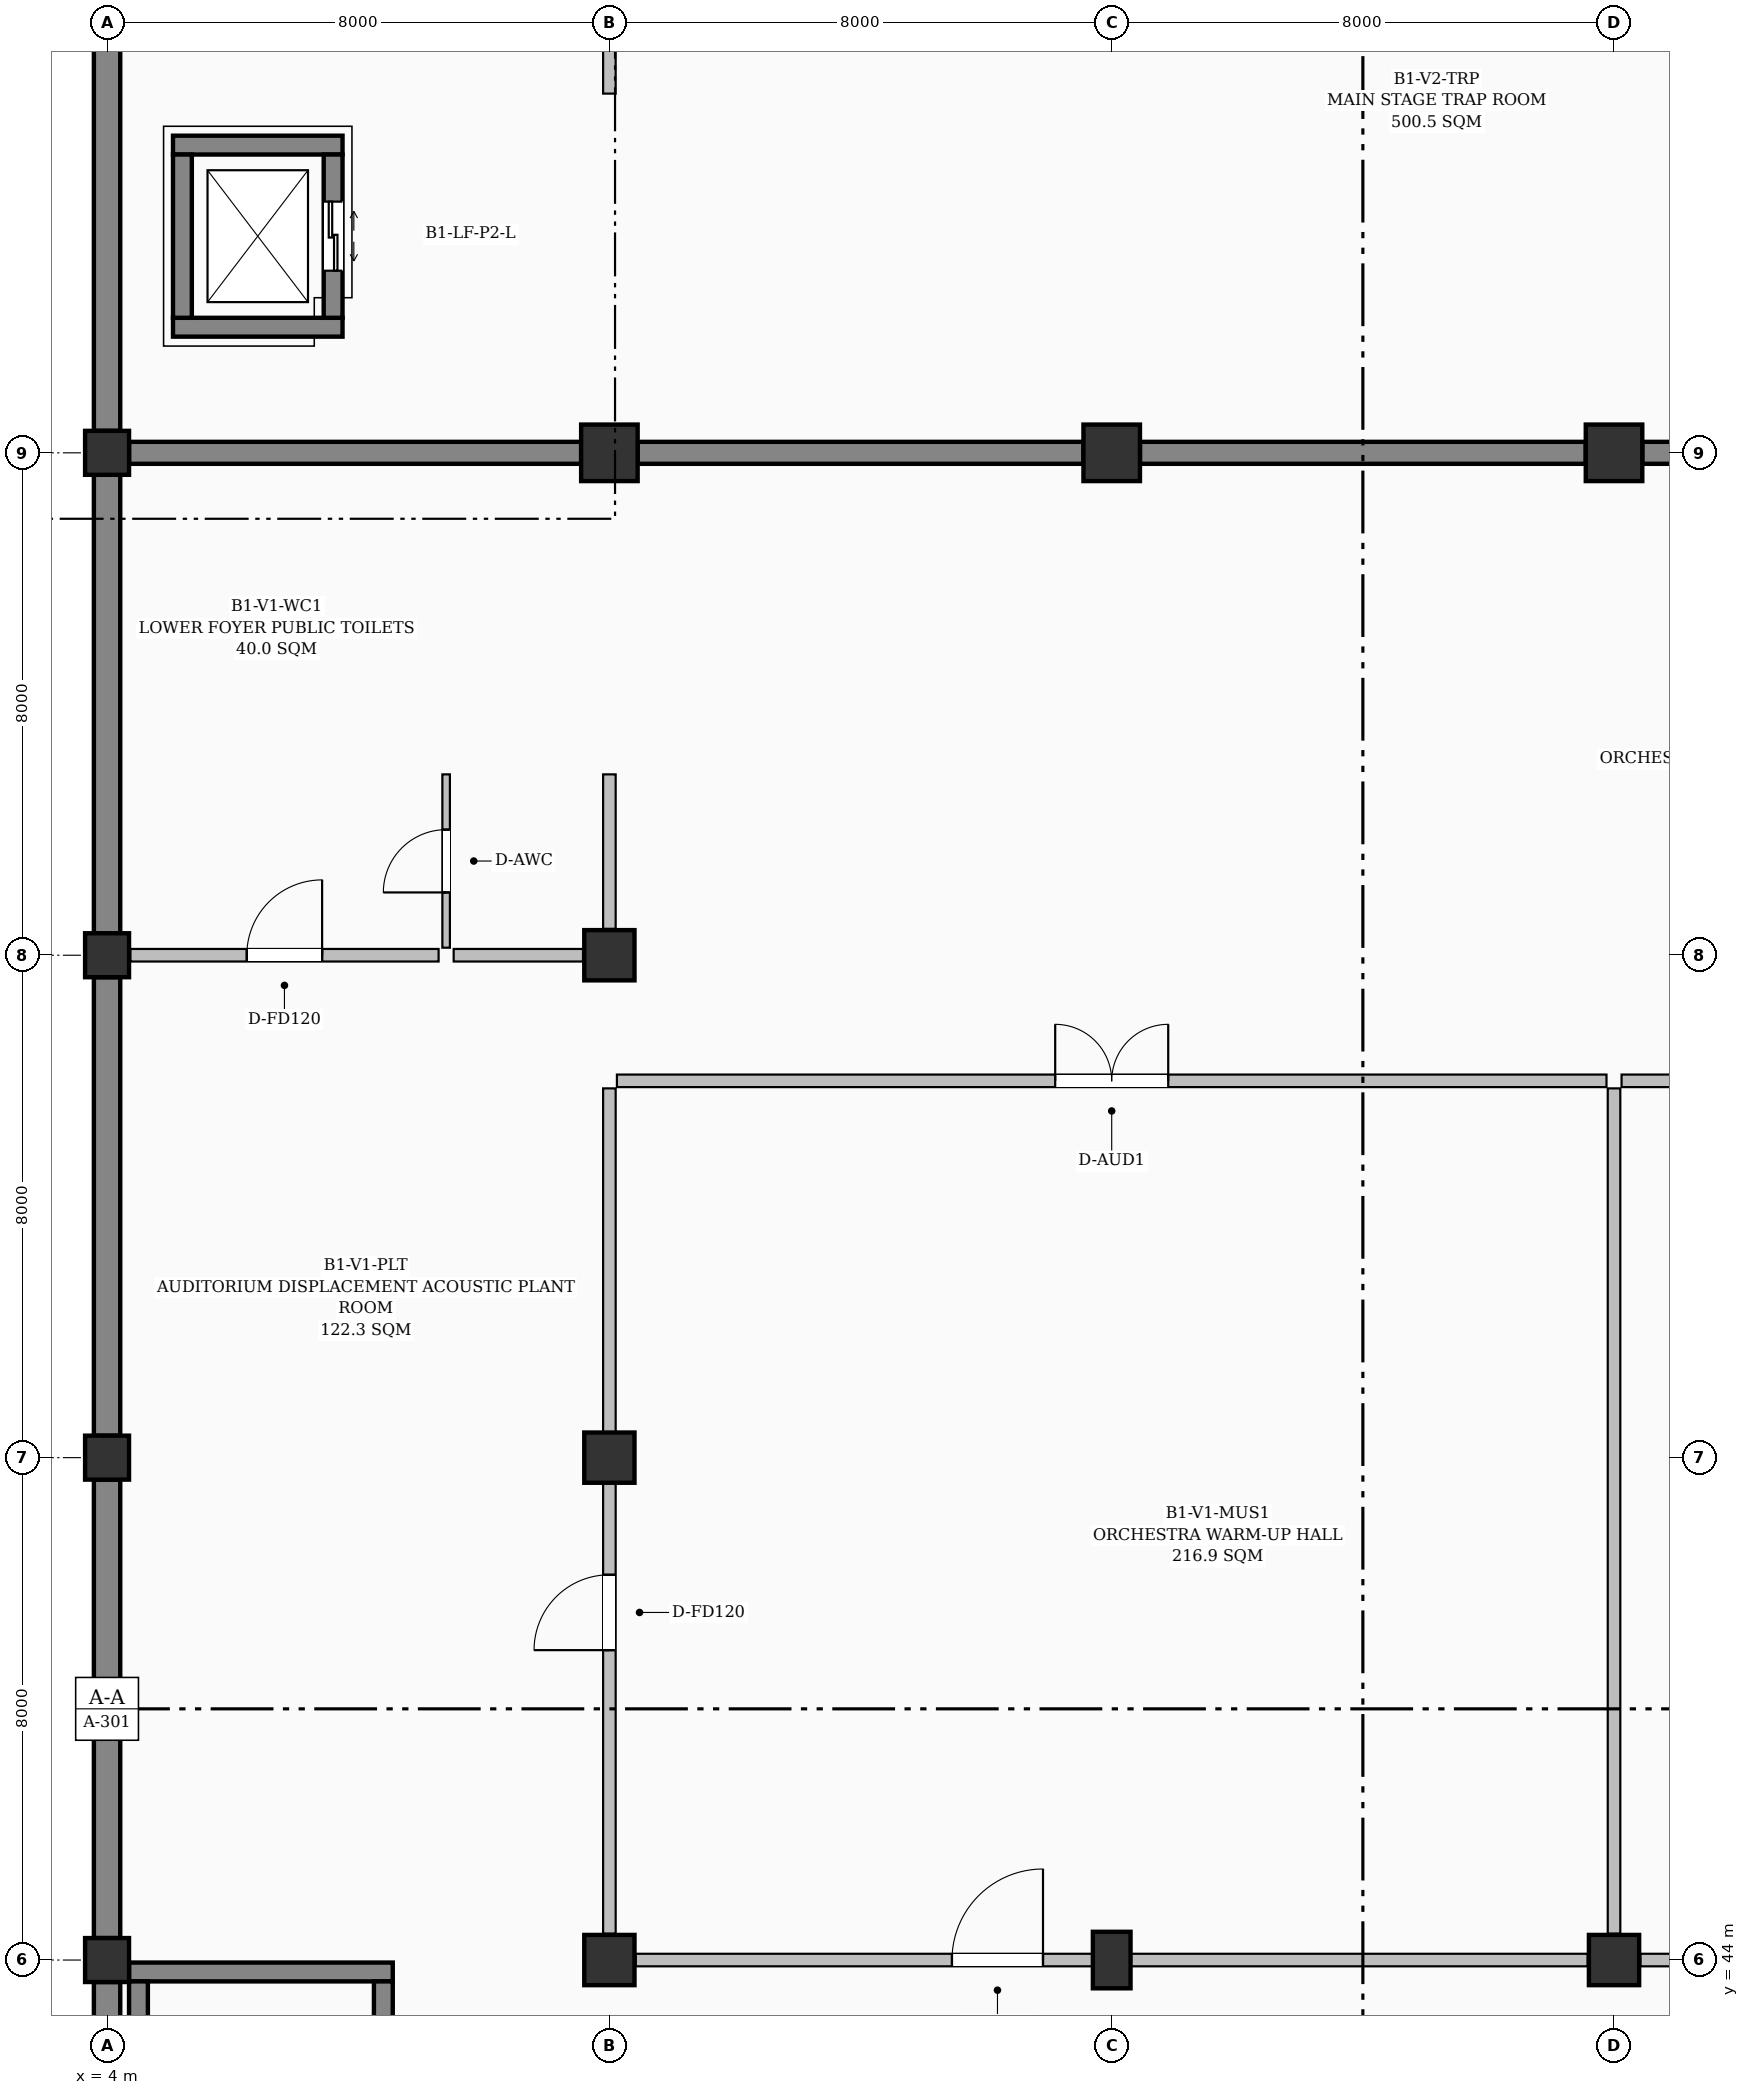
"""IFC4 building model, lengths in metres.
Left out: names, types, materials, properties, quantities, classifications, styles, units other than length and angle.
Written with IfcOpenShell. Run it as: python <this file> out.ifc"""

import sys

from ifc_helpers import new_model, si_unit, direction, frame, frame_2d, origin, origin_2d, place, context, subcontext, project, spatial, rectangle, extrude, element, fill, save


model = new_model("IFC4")
c1 = context("Model", 3, precision=1e-05, world=origin(), true_north=direction((0.0, 1.0)))
c2 = subcontext(c1, "Body", "Model", "MODEL_VIEW")
j1 = project(units=[si_unit("LENGTHUNIT", "METRE"), si_unit("PLANEANGLEUNIT", "RADIAN")], contexts=[c1])
p1 = place(None, origin())
s1 = spatial("IfcSite", under=j1, at=p1, CompositionType="ELEMENT")
p2 = place(p1, origin())
s2 = spatial("IfcBuilding", under=s1, at=p2, CompositionType="ELEMENT")
p3 = place(p2, frame((0.0, 0.0, -4.8)))
s3 = spatial("IfcBuildingStorey", under=s2, at=p3, CompositionType="ELEMENT", Elevation=-4.8)
for number, where, z_axis, x_axis in (
    (1, (4.0, 44.0, -0.38), (0.0, 0.0, 1.0), (1.0, 0.0, 0.0)),
    (2, (4.0, 52.0, -0.38), (0.0, 0.0, 1.0), (1.0, 0.0, 0.0)),
    (3, (4.0, 60.0, -0.38), (0.0, 0.0, 1.0), (1.0, 0.0, 0.0)),
    (4, (4.0, 68.0, -0.38), (0.0, 0.0, 1.0), (1.0, 0.0, 0.0)),
):
    element("IfcColumn", number, at=place(p3, frame(where, z_axis=z_axis, x_axis=x_axis)), inside=s3, PredefinedType="COLUMN", context=c2, shape_type="SweptSolid", body=[
        extrude(rectangle(XDim=0.7, YDim=0.7, at=origin_2d()), origin(), (0.0, 0.0, 1.0), 5.18),
    ])
for number, where, z_axis, x_axis in (
    (5, (12.0, 44.0, -0.38), (0.0, 0.0, 1.0), (1.0, 0.0, 0.0)),
    (6, (12.0, 52.0, -0.38), (0.0, 0.0, 1.0), (1.0, 0.0, 0.0)),
    (7, (12.0, 60.0, -0.38), (0.0, 0.0, 1.0), (1.0, 0.0, 0.0)),
):
    element("IfcColumn", number, at=place(p3, frame(where, z_axis=z_axis, x_axis=x_axis)), inside=s3, PredefinedType="COLUMN", context=c2, shape_type="SweptSolid", body=[
        extrude(rectangle(XDim=0.8, YDim=0.8, at=origin_2d()), origin(), (0.0, 0.0, 1.0), 5.18),
    ])
p4 = place(p3, frame((12.0, 68.0, -0.38), z_axis=(0.0, 0.0, 1.0), x_axis=(1.0, 0.0, 0.0)))
e8 = element("IfcColumn", 8, at=p4, inside=s3, PredefinedType="COLUMN", context=c2, shape_type="SweptSolid", body=[
    extrude(rectangle(XDim=0.9, YDim=0.9, at=origin_2d()), origin(), (0.0, 0.0, 1.0), 5.18),
])
p5 = place(p3, frame((20.0, 44.0, -0.38), z_axis=(0.0, 0.0, 1.0), x_axis=(1.0, 0.0, 0.0)))
e9 = element("IfcColumn", 9, at=p5, inside=s3, PredefinedType="COLUMN", context=c2, shape_type="SweptSolid", body=[
    extrude(rectangle(XDim=0.6, YDim=0.9, at=origin_2d()), origin(), (0.0, 0.0, 1.0), 5.18),
])
p6 = place(p3, frame((20.0, 68.0, -0.38), z_axis=(0.0, 0.0, 1.0), x_axis=(1.0, 0.0, 0.0)))
e10 = element("IfcColumn", 10, at=p6, inside=s3, PredefinedType="COLUMN", context=c2, shape_type="SweptSolid", body=[
    extrude(rectangle(XDim=0.9, YDim=0.9, at=origin_2d()), origin(), (0.0, 0.0, 1.0), 5.18),
])
p7 = place(p3, frame((28.0, 44.0, -0.38), z_axis=(0.0, 0.0, 1.0), x_axis=(1.0, 0.0, 0.0)))
e11 = element("IfcColumn", 11, at=p7, inside=s3, PredefinedType="COLUMN", context=c2, shape_type="SweptSolid", body=[
    extrude(rectangle(XDim=0.8, YDim=0.8, at=origin_2d()), origin(), (0.0, 0.0, 1.0), 5.18),
])
p8 = place(p3, frame((28.0, 68.0, -0.38), z_axis=(0.0, 0.0, 1.0), x_axis=(1.0, 0.0, 0.0)))
e12 = element("IfcColumn", 12, at=p8, inside=s3, PredefinedType="COLUMN", context=c2, shape_type="SweptSolid", body=[
    extrude(rectangle(XDim=0.9, YDim=0.9, at=origin_2d()), origin(), (0.0, 0.0, 1.0), 5.18),
])
for number, where, z_axis, x_axis in (
    (13, (4.0, 36.35, 0.0), (0.0, 0.0, 1.0), (0.0, 1.0, 0.0)),
    (14, (4.0, 44.35, 0.0), (0.0, 0.0, 1.0), (0.0, 1.0, 0.0)),
    (15, (4.0, 52.35, 0.0), (0.0, 0.0, 1.0), (0.0, 1.0, 0.0)),
    (16, (4.0, 60.35, 0.0), (0.0, 0.0, 1.0), (0.0, 1.0, 0.0)),
    (17, (4.0, 68.35, 0.0), (0.0, 0.0, 1.0), (0.0, 1.0, 0.0)),
):
    element("IfcWall", number, at=place(p3, frame(where, z_axis=z_axis, x_axis=x_axis)), inside=s3, PredefinedType="USERDEFINED", context=c2, shape_type="SweptSolid", body=[
        extrude(rectangle(XDim=7.3, YDim=0.42, at=frame_2d((3.65, 0.0))), origin(), (0.0, 0.0, 1.0), 3.85),
    ])
p9 = place(p3, frame((4.35, 68.0, 0.0), z_axis=(0.0, 0.0, 1.0), x_axis=(1.0, 0.0, 0.0)))
e18 = element("IfcWall", 18, at=p9, inside=s3, PredefinedType="SHEAR", context=c2, shape_type="SweptSolid", body=[
    extrude(rectangle(XDim=7.2, YDim=0.35, at=frame_2d((3.6, 0.0))), origin(), (0.0, 0.0, 1.0), 4.5),
])
for number, where, z_axis, x_axis in (
    (19, (12.45, 68.0, 0.0), (0.0, 0.0, 1.0), (1.0, 0.0, 0.0)),
    (20, (20.45, 68.0, 0.0), (0.0, 0.0, 1.0), (1.0, 0.0, 0.0)),
    (21, (28.45, 68.0, 0.0), (0.0, 0.0, 1.0), (1.0, 0.0, 0.0)),
):
    element("IfcWall", number, at=place(p3, frame(where, z_axis=z_axis, x_axis=x_axis)), inside=s3, PredefinedType="SHEAR", context=c2, shape_type="SweptSolid", body=[
        extrude(rectangle(XDim=7.1, YDim=0.35, at=frame_2d((3.55, 0.0))), origin(), (0.0, 0.0, 1.0), 4.5),
    ])
p10 = place(p3, frame((8.55, 43.81, -0.38), z_axis=(0.0, 0.0, 1.0), x_axis=(-1.0, 0.0, 0.0)))
e22 = element("IfcWall", 22, at=p10, inside=s3, PredefinedType="SHEAR", context=c2, shape_type="SweptSolid", body=[
    extrude(rectangle(XDim=4.2, YDim=0.3, at=frame_2d((2.1, 0.0))), origin(), (0.0, 0.0, 1.0), 4.88),
])
p11 = place(p3, frame((4.5, 36.34, -0.38), z_axis=(0.0, 0.0, 1.0), x_axis=(0.0, 1.0, 0.0)))
e23 = element("IfcWall", 23, at=p11, inside=s3, PredefinedType="SHEAR", context=c2, shape_type="SweptSolid", body=[
    extrude(rectangle(XDim=7.32, YDim=0.3, at=frame_2d((3.66, 0.0))), origin(), (0.0, 0.0, 1.0), 4.88),
])
p12 = place(p3, frame((8.4, 36.34, -0.38), z_axis=(0.0, 0.0, 1.0), x_axis=(0.0, 1.0, 0.0)))
e24 = element("IfcWall", 24, at=p12, inside=s3, PredefinedType="SHEAR", context=c2, shape_type="SweptSolid", body=[
    extrude(rectangle(XDim=7.32, YDim=0.3, at=frame_2d((3.66, 0.0))), origin(), (0.0, 0.0, 1.0), 4.88),
])
p13 = place(p12, frame((0.35, 0.0, 0.38)))
e25 = element("IfcOpeningElement", 25, at=p13, cuts=e24, PredefinedType="OPENING", context=c2, shape_type="SweptSolid", body=[
    extrude(rectangle(XDim=1.2, YDim=2.15, at=frame_2d((0.6, 1.075))), frame((0.0, 0.16, 0.0), z_axis=(0.0, -1.0, 0.0), x_axis=(1.0, 0.0, 0.0)), (0.0, 0.0, 1.0), 0.32),
])
for number, where, z_axis, x_axis in (
    (26, (5.05, 70.0, -1.2), (0.0, 0.0, 1.0), (1.0, 0.0, 0.0)),
    (27, (7.75, 72.9, -1.2), (0.0, 0.0, 1.0), (-1.0, 0.0, 0.0)),
):
    element("IfcWall", number, at=place(p3, frame(where, z_axis=z_axis, x_axis=x_axis)), inside=s3, PredefinedType="SHEAR", context=c2, shape_type="SweptSolid", body=[
        extrude(rectangle(XDim=2.7, YDim=0.3, at=frame_2d((1.35, 0.0))), origin(), (0.0, 0.0, 1.0), 5.7),
    ])
p14 = place(p3, frame((5.2, 70.15, -1.2), z_axis=(0.0, 0.0, 1.0), x_axis=(0.0, 1.0, 0.0)))
e28 = element("IfcWall", 28, at=p14, inside=s3, PredefinedType="SHEAR", context=c2, shape_type="SweptSolid", body=[
    extrude(rectangle(XDim=2.6, YDim=0.3, at=frame_2d((1.3, 0.0))), origin(), (0.0, 0.0, 1.0), 5.7),
])
p15 = place(p3, frame((7.6, 72.75, -1.2), z_axis=(0.0, 0.0, 1.0), x_axis=(0.0, -1.0, 0.0)))
e29 = element("IfcWall", 29, at=p15, inside=s3, PredefinedType="SHEAR", context=c2, shape_type="SweptSolid", body=[
    extrude(rectangle(XDim=2.6, YDim=0.3, at=frame_2d((1.3, 0.0))), origin(), (0.0, 0.0, 1.0), 5.7),
])
p16 = place(p15, frame((0.75, 0.0, 1.2)))
e30 = element("IfcOpeningElement", 30, at=p16, cuts=e29, PredefinedType="OPENING", context=c2, shape_type="SweptSolid", body=[
    extrude(rectangle(XDim=1.1, YDim=2.15, at=frame_2d((0.55, 1.075))), frame((0.0, 0.16, 0.0), z_axis=(0.0, -1.0, 0.0), x_axis=(1.0, 0.0, 0.0)), (0.0, 0.0, 1.0), 0.32),
])
p17 = place(p3, frame((12.12, 58.0, 0.0), z_axis=(0.0, 0.0, 1.0), x_axis=(1.0, 0.0, 0.0)))
e31 = element("IfcWall", 31, at=p17, inside=s3, PredefinedType="PARTITIONING", context=c2, shape_type="SweptSolid", body=[
    extrude(rectangle(XDim=15.76, YDim=0.2, at=frame_2d((7.88, 0.0))), origin(), (0.0, 0.0, 1.0), 4.5),
])
p18 = place(p17, frame((6.98, 0.0, 0.0)))
e32 = element("IfcOpeningElement", 32, at=p18, cuts=e31, PredefinedType="OPENING", context=c2, shape_type="SweptSolid", body=[
    extrude(rectangle(XDim=1.8, YDim=2.35, at=frame_2d((0.9, 1.175))), frame((0.0, 0.11, 0.0), z_axis=(0.0, -1.0, 0.0), x_axis=(1.0, 0.0, 0.0)), (0.0, 0.0, 1.0), 0.22),
])
p19 = place(p3, frame((28.12, 58.0, 0.0), z_axis=(0.0, 0.0, 1.0), x_axis=(1.0, 0.0, 0.0)))
e33 = element("IfcWall", 33, at=p19, inside=s3, PredefinedType="PARTITIONING", context=c2, shape_type="SweptSolid", body=[
    extrude(rectangle(XDim=15.76, YDim=0.2, at=frame_2d((7.88, 0.0))), origin(), (0.0, 0.0, 1.0), 4.5),
])
p20 = place(p19, frame((6.98, 0.0, 0.0)))
e34 = element("IfcOpeningElement", 34, at=p20, cuts=e33, PredefinedType="OPENING", context=c2, shape_type="SweptSolid", body=[
    extrude(rectangle(XDim=1.8, YDim=2.35, at=frame_2d((0.9, 1.175))), frame((0.0, 0.11, 0.0), z_axis=(0.0, -1.0, 0.0), x_axis=(1.0, 0.0, 0.0)), (0.0, 0.0, 1.0), 0.22),
])
p21 = place(p3, frame((12.0, 60.42, 0.0), z_axis=(0.0, 0.0, 1.0), x_axis=(0.0, 1.0, 0.0)))
e35 = element("IfcWall", 35, at=p21, inside=s3, PredefinedType="PARTITIONING", context=c2, shape_type="SweptSolid", body=[
    extrude(rectangle(XDim=2.46, YDim=0.2, at=frame_2d((1.23, 0.0))), origin(), (0.0, 0.0, 1.0), 4.125),
])
p22 = place(p3, frame((28.0, 44.42, 0.0), z_axis=(0.0, 0.0, 1.0), x_axis=(0.0, 1.0, 0.0)))
e36 = element("IfcWall", 36, at=p22, inside=s3, PredefinedType="PARTITIONING", context=c2, shape_type="SweptSolid", body=[
    extrude(rectangle(XDim=13.46, YDim=0.2, at=frame_2d((6.73, 0.0))), origin(), (0.0, 0.0, 1.0), 3.285),
])
p23 = place(p3, frame((12.42, 44.0, 0.0), z_axis=(0.0, 0.0, 1.0), x_axis=(1.0, 0.0, 0.0)))
e37 = element("IfcWall", 37, at=p23, inside=s3, PredefinedType="PARTITIONING", context=c2, shape_type="SweptSolid", body=[
    extrude(rectangle(XDim=15.16, YDim=0.2, at=frame_2d((7.58, 0.0))), origin(), (0.0, 0.0, 1.0), 3.735),
])
p24 = place(p23, frame((5.036, 0.0, 0.0)))
e38 = element("IfcOpeningElement", 38, at=p24, cuts=e37, PredefinedType="OPENING", context=c2, shape_type="SweptSolid", body=[
    extrude(rectangle(XDim=1.45, YDim=2.25, at=frame_2d((0.725, 1.125))), frame((0.0, 0.11, 0.0), z_axis=(0.0, -1.0, 0.0), x_axis=(1.0, 0.0, 0.0)), (0.0, 0.0, 1.0), 0.22),
])
p25 = place(p3, frame((12.0, 44.42, 0.0), z_axis=(0.0, 0.0, 1.0), x_axis=(0.0, 1.0, 0.0)))
e39 = element("IfcWall", 39, at=p25, inside=s3, PredefinedType="PARTITIONING", context=c2, shape_type="SweptSolid", body=[
    extrude(rectangle(XDim=13.46, YDim=0.2, at=frame_2d((6.73, 0.0))), origin(), (0.0, 0.0, 1.0), 4.035),
])
p26 = place(p25, frame((4.515, 0.0, 0.0)))
e40 = element("IfcOpeningElement", 40, at=p26, cuts=e39, PredefinedType="OPENING", context=c2, shape_type="SweptSolid", body=[
    extrude(rectangle(XDim=1.2, YDim=2.2, at=frame_2d((0.6, 1.1))), frame((0.0, 0.11, 0.0), z_axis=(0.0, -1.0, 0.0), x_axis=(1.0, 0.0, 0.0)), (0.0, 0.0, 1.0), 0.22),
])
p27 = place(p3, frame((28.42, 44.0, 0.0), z_axis=(0.0, 0.0, 1.0), x_axis=(1.0, 0.0, 0.0)))
e41 = element("IfcWall", 41, at=p27, inside=s3, PredefinedType="PARTITIONING", context=c2, shape_type="SweptSolid", body=[
    extrude(rectangle(XDim=15.16, YDim=0.2, at=frame_2d((7.58, 0.0))), origin(), (0.0, 0.0, 1.0), 3.635),
])
p28 = place(p27, frame((5.036, 0.0, 0.0)))
e42 = element("IfcOpeningElement", 42, at=p28, cuts=e41, PredefinedType="OPENING", context=c2, shape_type="SweptSolid", body=[
    extrude(rectangle(XDim=1.45, YDim=2.25, at=frame_2d((0.725, 1.125))), frame((0.0, 0.11, 0.0), z_axis=(0.0, -1.0, 0.0), x_axis=(1.0, 0.0, 0.0)), (0.0, 0.0, 1.0), 0.22),
])
p29 = place(p3, frame((4.37, 60.0, 0.0), z_axis=(0.0, 0.0, 1.0), x_axis=(1.0, 0.0, 0.0)))
e43 = element("IfcWall", 43, at=p29, inside=s3, PredefinedType="PARTITIONING", context=c2, shape_type="SweptSolid", body=[
    extrude(rectangle(XDim=4.91, YDim=0.2, at=frame_2d((2.455, 0.0))), origin(), (0.0, 0.0, 1.0), 3.735),
])
p30 = place(p29, frame((1.855, 0.0, 0.0)))
e44 = element("IfcOpeningElement", 44, at=p30, cuts=e43, PredefinedType="OPENING", context=c2, shape_type="SweptSolid", body=[
    extrude(rectangle(XDim=1.2, YDim=2.2, at=frame_2d((0.6, 1.1))), frame((0.0, 0.11, 0.0), z_axis=(0.0, -1.0, 0.0), x_axis=(1.0, 0.0, 0.0)), (0.0, 0.0, 1.0), 0.22),
])
p31 = place(p3, frame((9.52, 60.0, 0.0), z_axis=(0.0, 0.0, 1.0), x_axis=(1.0, 0.0, 0.0)))
e45 = element("IfcWall", 45, at=p31, inside=s3, PredefinedType="PARTITIONING", context=c2, shape_type="SweptSolid", body=[
    extrude(rectangle(XDim=2.06, YDim=0.2, at=frame_2d((1.03, 0.0))), origin(), (0.0, 0.0, 1.0), 3.735),
])
p32 = place(p3, frame((9.4, 60.12, 0.0), z_axis=(0.0, 0.0, 1.0), x_axis=(0.0, 1.0, 0.0)))
e46 = element("IfcWall", 46, at=p32, inside=s3, PredefinedType="PARTITIONING", context=c2, shape_type="SweptSolid", body=[
    extrude(rectangle(XDim=2.76, YDim=0.12, at=frame_2d((1.38, 0.0))), origin(), (0.0, 0.0, 1.0), 4.5),
])
p33 = place(p32, frame((0.88, 0.0, 0.0)))
e47 = element("IfcOpeningElement", 47, at=p33, cuts=e46, PredefinedType="OPENING", context=c2, shape_type="SweptSolid", body=[
    extrude(rectangle(XDim=1.0, YDim=2.1, at=frame_2d((0.5, 1.05))), frame((0.0, 0.07, 0.0), z_axis=(0.0, -1.0, 0.0), x_axis=(1.0, 0.0, 0.0)), (0.0, 0.0, 1.0), 0.14),
])
p34 = place(p3, frame((12.0, 73.72, 0.0), z_axis=(0.0, 0.0, 1.0), x_axis=(0.0, 1.0, 0.0)))
e48 = element("IfcWall", 48, at=p34, inside=s3, PredefinedType="PARTITIONING", context=c2, shape_type="SweptSolid", body=[
    extrude(rectangle(XDim=8.16, YDim=0.2, at=frame_2d((4.08, 0.0))), origin(), (0.0, 0.0, 1.0), 4.095),
])
p35 = place(p34, frame((4.159, 0.0, 0.0)))
e49 = element("IfcOpeningElement", 49, at=p35, cuts=e48, PredefinedType="OPENING", context=c2, shape_type="SweptSolid", body=[
    extrude(rectangle(XDim=1.8, YDim=2.35, at=frame_2d((0.9, 1.175))), frame((0.0, 0.11, 0.0), z_axis=(0.0, -1.0, 0.0), x_axis=(1.0, 0.0, 0.0)), (0.0, 0.0, 1.0), 0.22),
])
p36 = place(p16, origin())
e50 = element("IfcDoor", 50, at=p36, inside=s3, OperationType="DOUBLE_DOOR_SLIDING", PredefinedType="DOOR", context=c2, shape_type="SweptSolid", body=[
    extrude(rectangle(XDim=1.1, YDim=2.15, at=frame_2d((0.55, 1.075))), frame((0.0, 0.025, 0.0), z_axis=(0.0, -1.0, 0.0), x_axis=(1.0, 0.0, 0.0)), (0.0, 0.0, 1.0), 0.05),
])
fill(e30, e50)
p37 = place(p18, origin())
e51 = element("IfcDoor", 51, at=p37, inside=s3, OperationType="DOUBLE_DOOR_SINGLE_SWING", PredefinedType="DOOR", context=c2, shape_type="SweptSolid", body=[
    extrude(rectangle(XDim=1.8, YDim=2.35, at=frame_2d((0.9, 1.175))), frame((0.0, 0.025, 0.0), z_axis=(0.0, -1.0, 0.0), x_axis=(1.0, 0.0, 0.0)), (0.0, 0.0, 1.0), 0.05),
])
fill(e32, e51)
p38 = place(p24, origin())
e52 = element("IfcDoor", 52, at=p38, inside=s3, OperationType="SINGLE_SWING_RIGHT", PredefinedType="DOOR", context=c2, shape_type="SweptSolid", body=[
    extrude(rectangle(XDim=1.45, YDim=2.25, at=frame_2d((0.725, 1.125))), frame((0.0, 0.025, 0.0), z_axis=(0.0, -1.0, 0.0), x_axis=(1.0, 0.0, 0.0)), (0.0, 0.0, 1.0), 0.05),
])
fill(e38, e52)
p39 = place(p26, origin())
e53 = element("IfcDoor", 53, at=p39, inside=s3, OperationType="SINGLE_SWING_LEFT", PredefinedType="DOOR", context=c2, shape_type="SweptSolid", body=[
    extrude(rectangle(XDim=1.2, YDim=2.2, at=frame_2d((0.6, 1.1))), frame((0.0, 0.025, 0.0), z_axis=(0.0, -1.0, 0.0), x_axis=(1.0, 0.0, 0.0)), (0.0, 0.0, 1.0), 0.05),
])
fill(e40, e53)
p40 = place(p30, origin())
e54 = element("IfcDoor", 54, at=p40, inside=s3, OperationType="SINGLE_SWING_RIGHT", PredefinedType="DOOR", context=c2, shape_type="SweptSolid", body=[
    extrude(rectangle(XDim=1.2, YDim=2.2, at=frame_2d((0.6, 1.1))), frame((0.0, 0.025, 0.0), z_axis=(0.0, -1.0, 0.0), x_axis=(1.0, 0.0, 0.0)), (0.0, 0.0, 1.0), 0.05),
])
fill(e44, e54)
p41 = place(p33, origin())
e55 = element("IfcDoor", 55, at=p41, inside=s3, OperationType="SINGLE_SWING_LEFT", PredefinedType="DOOR", context=c2, shape_type="SweptSolid", body=[
    extrude(rectangle(XDim=1.0, YDim=2.1, at=frame_2d((0.5, 1.05))), frame((0.0, 0.025, 0.0), z_axis=(0.0, -1.0, 0.0), x_axis=(1.0, 0.0, 0.0)), (0.0, 0.0, 1.0), 0.05),
])
fill(e47, e55)
save(model, sys.argv[1])
